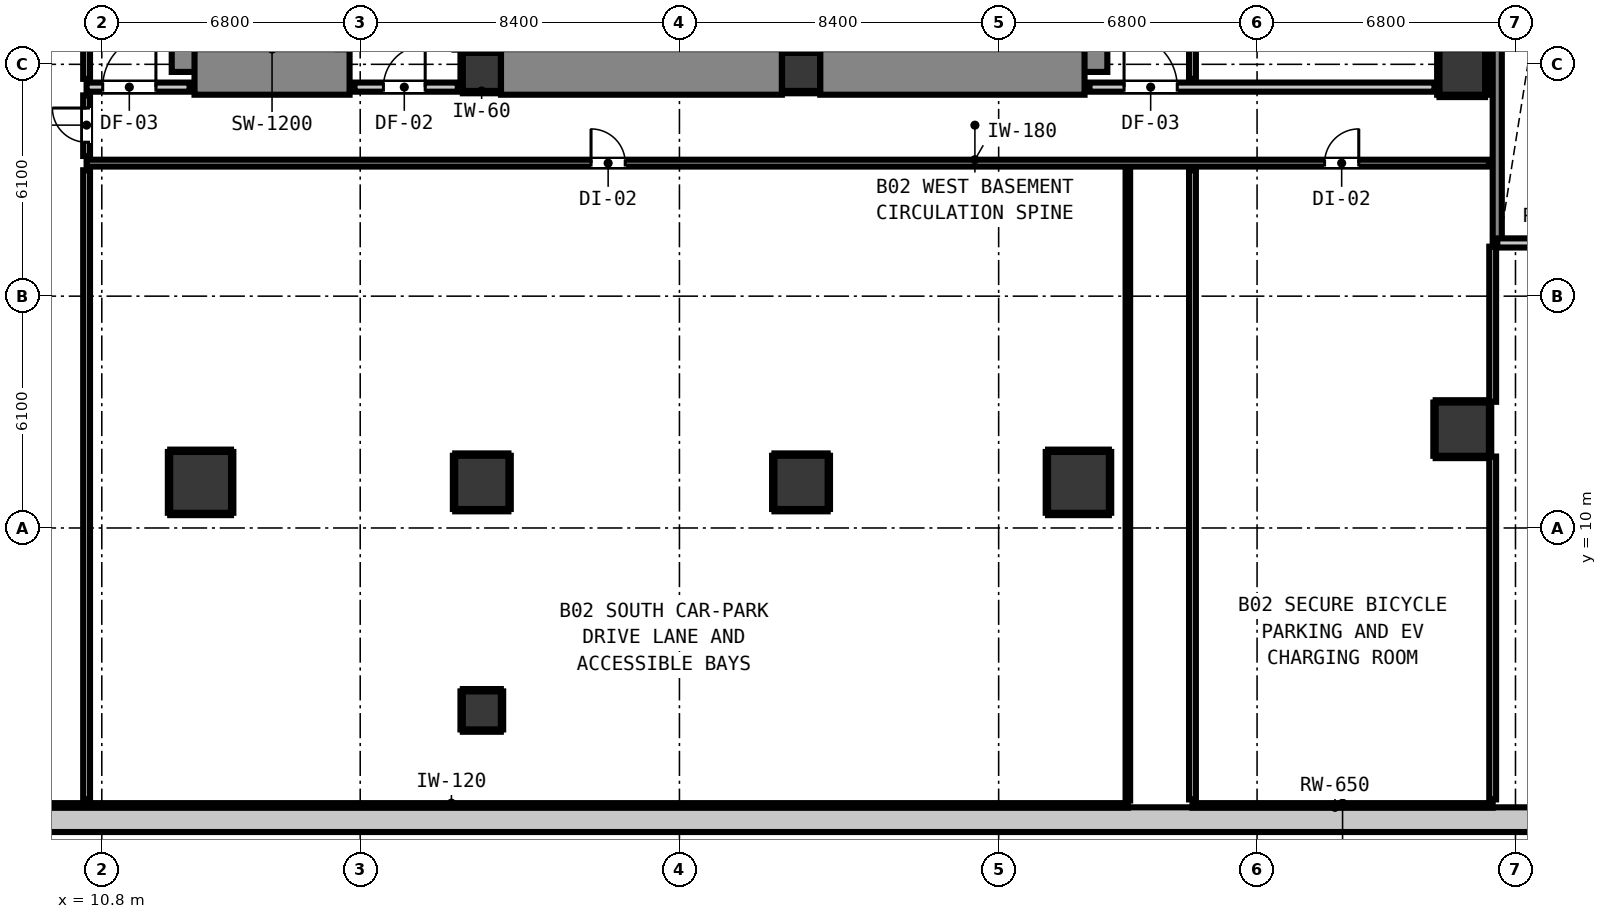
"""IFC4 building model, lengths in metres.
Left out: names, types, materials, properties, quantities, classifications, styles, units other than length and angle.
Written with IfcOpenShell. Run it as: python <this file> out.ifc"""

import sys

from ifc_helpers import new_model, si_unit, direction, frame, frame_2d, origin, origin_2d, place, context, subcontext, project, spatial, rectangle, circle, extrude, element, fill, save


model = new_model("IFC4")
c1 = context("Model", 3, precision=1e-05, world=origin(), true_north=direction((0.0, 1.0)))
c2 = subcontext(c1, "Body", "Model", "MODEL_VIEW")
j1 = project(units=[si_unit("LENGTHUNIT", "METRE"), si_unit("PLANEANGLEUNIT", "RADIAN")], contexts=[c1])
p1 = place(None, origin())
s1 = spatial("IfcSite", under=j1, at=p1, CompositionType="ELEMENT")
p2 = place(p1, origin())
s2 = spatial("IfcBuilding", under=s1, at=p2, CompositionType="ELEMENT")
p3 = place(p2, frame((0.0, 0.0, -8.8)))
s3 = spatial("IfcBuildingStorey", under=s2, at=p3, CompositionType="ELEMENT", Elevation=-8.8)
p4 = place(p3, frame((1.5, 2.325, 0.0), z_axis=(0.0, 0.0, 1.0), x_axis=(1.0, 0.0, 0.0)))
e1 = element("IfcWall", 1, at=p4, inside=s3, PredefinedType="SOLIDWALL", context=c2, shape_type="SweptSolid", body=[
    extrude(rectangle(XDim=83.5, YDim=0.65, at=frame_2d((41.75, 0.0))), origin(), (0.0, 0.0, 1.0), 4.4),
])
for number, where, z_axis, x_axis in (
    (2, (20.8, 22.0, 0.0), (0.0, 0.0, 1.0), (1.0, 0.0, 0.0)),
    (3, (29.2, 22.0, 0.0), (0.0, 0.0, 1.0), (1.0, 0.0, 0.0)),
):
    element("IfcColumn", number, at=place(p3, frame(where, z_axis=z_axis, x_axis=x_axis)), inside=s3, PredefinedType="COLUMN", context=c2, shape_type="SweptSolid", body=[
        extrude(rectangle(XDim=1.0, YDim=1.0, at=origin_2d()), origin(), (0.0, 0.0, 1.0), 4.4),
    ])
p5 = place(p3, frame((13.24, 22.0, 0.0), z_axis=(0.0, 0.0, 1.0), x_axis=(0.0, 1.0, 0.0)))
e4 = element("IfcWall", 4, at=p5, inside=s3, PredefinedType="SHEAR", context=c2, shape_type="SweptSolid", body=[
    extrude(rectangle(XDim=8.195, YDim=1.2, at=frame_2d((4.098, 0.0))), origin(), (0.0, 0.0, 1.0), 4.4),
])
p6 = place(p3, frame((13.24, 22.0, 0.0), z_axis=(0.0, 0.0, 1.0), x_axis=(1.0, 0.0, 0.0)))
e5 = element("IfcWall", 5, at=p6, inside=s3, PredefinedType="SHEAR", context=c2, shape_type="SweptSolid", body=[
    extrude(rectangle(XDim=4.08, YDim=1.2, at=frame_2d((2.04, 0.0))), origin(), (0.0, 0.0, 1.0), 4.4),
])
p7 = place(p3, frame((36.66, 22.0, 0.0), z_axis=(0.0, 0.0, 1.0), x_axis=(0.0, 1.0, 0.0)))
e6 = element("IfcWall", 6, at=p7, inside=s3, PredefinedType="SHEAR", context=c2, shape_type="SweptSolid", body=[
    extrude(rectangle(XDim=8.195, YDim=1.2, at=frame_2d((4.098, 0.0))), origin(), (0.0, 0.0, 1.0), 4.4),
])
p8 = place(p3, frame((29.705, 22.0, 0.0), z_axis=(0.0, 0.0, 1.0), x_axis=(1.0, 0.0, 0.0)))
e7 = element("IfcWall", 7, at=p8, inside=s3, PredefinedType="SHEAR", context=c2, shape_type="SweptSolid", body=[
    extrude(rectangle(XDim=6.955, YDim=1.2, at=frame_2d((3.478, 0.0))), origin(), (0.0, 0.0, 1.0), 4.4),
])
p9 = place(p3, frame((21.305, 22.0, 0.0), z_axis=(0.0, 0.0, 1.0), x_axis=(1.0, 0.0, 0.0)))
e8 = element("IfcWall", 8, at=p9, inside=s3, PredefinedType="SHEAR", context=c2, shape_type="SweptSolid", body=[
    extrude(rectangle(XDim=7.39, YDim=1.2, at=frame_2d((3.695, 0.0))), origin(), (0.0, 0.0, 1.0), 4.4),
])
p10 = place(p3, frame((47.52, 17.5, 0.0), z_axis=(0.0, 0.0, 1.0), x_axis=(0.0, 1.0, 0.0)))
e9 = element("IfcWall", 9, at=p10, inside=s3, PredefinedType="SHEAR", context=c2, shape_type="SweptSolid", body=[
    extrude(rectangle(XDim=19.2, YDim=0.24, at=frame_2d((9.6, 0.0))), origin(), (0.0, 0.0, 1.0), 4.4),
])
for number, where, z_axis, x_axis in (
    (10, (13.4, 11.2, 0.0), (0.0, 0.0, 1.0), (1.0, 0.0, 0.0)),
    (11, (36.5, 11.2, 0.0), (0.0, 0.0, 1.0), (1.0, 0.0, 0.0)),
):
    element("IfcColumn", number, at=place(p3, frame(where, z_axis=z_axis, x_axis=x_axis)), inside=s3, PredefinedType="COLUMN", context=c2, shape_type="SweptSolid", body=[
        extrude(rectangle(XDim=1.6, YDim=1.6, at=origin_2d()), origin(), (0.0, 0.0, 1.0), 4.4),
    ])
p11 = place(p3, frame((46.6, 22.0, 0.0), z_axis=(0.0, 0.0, 1.0), x_axis=(1.0, 0.0, 0.0)))
e12 = element("IfcColumn", 12, at=p11, inside=s3, PredefinedType="COLUMN", context=c2, shape_type="SweptSolid", body=[
    extrude(circle(Radius=0.6, at=origin_2d()), origin(), (0.0, 0.0, 1.0), 4.4),
])
for number, where, z_axis, x_axis in (
    (13, (46.6, 12.6, 0.0), (0.0, 0.0, 1.0), (1.0, 0.0, 0.0)),
    (14, (20.8, 11.2, 0.0), (0.0, 0.0, 1.0), (1.0, 0.0, 0.0)),
    (15, (29.2, 11.2, 0.0), (0.0, 0.0, 1.0), (1.0, 0.0, 0.0)),
):
    element("IfcColumn", number, at=place(p3, frame(where, z_axis=z_axis, x_axis=x_axis)), inside=s3, PredefinedType="COLUMN", context=c2, shape_type="SweptSolid", body=[
        extrude(rectangle(XDim=1.4, YDim=1.4, at=origin_2d()), origin(), (0.0, 0.0, 1.0), 4.4),
    ])
p12 = place(p3, frame((20.8, 5.2, 0.0), z_axis=(0.0, 0.0, 1.0), x_axis=(1.0, 0.0, 0.0)))
e16 = element("IfcColumn", 16, at=p12, inside=s3, PredefinedType="COLUMN", context=c2, shape_type="SweptSolid", body=[
    extrude(rectangle(XDim=1.0, YDim=1.0, at=origin_2d()), origin(), (0.0, 0.0, 1.0), 4.4),
])
p13 = place(p3, frame((47.52, 17.5, 0.0), z_axis=(0.0, 0.0, 1.0), x_axis=(1.0, 0.0, 0.0)))
e17 = element("IfcWall", 17, at=p13, inside=s3, PredefinedType="PARAPET", context=c2, shape_type="SweptSolid", body=[
    extrude(rectangle(XDim=3.16, YDim=0.24, at=frame_2d((1.58, 0.0))), origin(), (0.0, 0.0, 1.0), 1.2),
])
p14 = place(p3, frame((10.4, 21.6, 0.0), z_axis=(0.0, 0.0, 1.0), x_axis=(1.0, 0.0, 0.0)))
e18 = element("IfcWall", 18, at=p14, inside=s3, PredefinedType="PARTITIONING", context=c2, shape_type="SweptSolid", body=[
    extrude(rectangle(XDim=2.71, YDim=0.24, at=frame_2d((1.355, 0.0))), origin(), (0.0, 0.0, 1.0), 3.335),
])
p15 = place(p14, frame((0.424, 0.0, 0.0)))
e19 = element("IfcOpeningElement", 19, at=p15, cuts=e18, PredefinedType="OPENING", context=c2, shape_type="SweptSolid", body=[
    extrude(rectangle(XDim=1.4, YDim=2.15, at=frame_2d((0.7, 1.075))), frame((0.0, 0.13, 0.0), z_axis=(0.0, -1.0, 0.0), x_axis=(1.0, 0.0, 0.0)), (0.0, 0.0, 1.0), 0.26),
])
p16 = place(p3, frame((17.45, 21.6, 0.0), z_axis=(0.0, 0.0, 1.0), x_axis=(1.0, 0.0, 0.0)))
e20 = element("IfcWall", 20, at=p16, inside=s3, PredefinedType="PARTITIONING", context=c2, shape_type="SweptSolid", body=[
    extrude(rectangle(XDim=2.718, YDim=0.24, at=frame_2d((1.359, 0.0))), origin(), (0.0, 0.0, 1.0), 3.335),
])
p17 = place(p16, frame((0.76, 0.0, 0.0)))
e21 = element("IfcOpeningElement", 21, at=p17, cuts=e20, PredefinedType="OPENING", context=c2, shape_type="SweptSolid", body=[
    extrude(rectangle(XDim=1.1, YDim=2.15, at=frame_2d((0.55, 1.075))), frame((0.0, 0.13, 0.0), z_axis=(0.0, -1.0, 0.0), x_axis=(1.0, 0.0, 0.0)), (0.0, 0.0, 1.0), 0.26),
])
p18 = place(p3, frame((36.79, 21.6, 0.0), z_axis=(0.0, 0.0, 1.0), x_axis=(1.0, 0.0, 0.0)))
e22 = element("IfcWall", 22, at=p18, inside=s3, PredefinedType="PARTITIONING", context=c2, shape_type="SweptSolid", body=[
    extrude(rectangle(XDim=9.078, YDim=0.24, at=frame_2d((4.539, 0.0))), origin(), (0.0, 0.0, 1.0), 3.335),
])
p19 = place(p18, frame((0.91, 0.0, 0.0)))
e23 = element("IfcOpeningElement", 23, at=p19, cuts=e22, PredefinedType="OPENING", context=c2, shape_type="SweptSolid", body=[
    extrude(rectangle(XDim=1.4, YDim=2.15, at=frame_2d((0.7, 1.075))), frame((0.0, 0.13, 0.0), z_axis=(0.0, -1.0, 0.0), x_axis=(1.0, 0.0, 0.0)), (0.0, 0.0, 1.0), 0.26),
])
p20 = place(p3, frame((10.4, 19.6, 0.0), z_axis=(0.0, 0.0, 1.0), x_axis=(1.0, 0.0, 0.0)))
e24 = element("IfcWall", 24, at=p20, inside=s3, PredefinedType="PARTITIONING", context=c2, shape_type="SweptSolid", body=[
    extrude(rectangle(XDim=36.902, YDim=0.18, at=frame_2d((18.451, 0.0))), origin(), (0.0, 0.0, 1.0), 4.1),
])
p21 = place(p20, frame((13.274, 0.0, 0.0)))
e25 = element("IfcOpeningElement", 25, at=p21, cuts=e24, PredefinedType="OPENING", context=c2, shape_type="SweptSolid", body=[
    extrude(rectangle(XDim=0.9, YDim=2.1, at=frame_2d((0.45, 1.05))), frame((0.0, 0.1, 0.0), z_axis=(0.0, -1.0, 0.0), x_axis=(1.0, 0.0, 0.0)), (0.0, 0.0, 1.0), 0.2),
])
p22 = place(p20, frame((32.576, 0.0, 0.0)))
e26 = element("IfcOpeningElement", 26, at=p22, cuts=e24, PredefinedType="OPENING", context=c2, shape_type="SweptSolid", body=[
    extrude(rectangle(XDim=0.9, YDim=2.1, at=frame_2d((0.45, 1.05))), frame((0.0, 0.1, 0.0), z_axis=(0.0, -1.0, 0.0), x_axis=(1.0, 0.0, 0.0)), (0.0, 0.0, 1.0), 0.2),
])
p23 = place(p3, frame((2.2, 2.7, 0.0), z_axis=(0.0, 0.0, 1.0), x_axis=(1.0, 0.0, 0.0)))
e27 = element("IfcWall", 27, at=p23, inside=s3, PredefinedType="PARTITIONING", context=c2, shape_type="SweptSolid", body=[
    extrude(rectangle(XDim=35.6, YDim=0.12, at=frame_2d((17.8, 0.0))), origin(), (0.0, 0.0, 1.0), 4.1),
])
p24 = place(p3, frame((39.5, 2.7, 0.0), z_axis=(0.0, 0.0, 1.0), x_axis=(1.0, 0.0, 0.0)))
e28 = element("IfcWall", 28, at=p24, inside=s3, PredefinedType="PARTITIONING", context=c2, shape_type="SweptSolid", body=[
    extrude(rectangle(XDim=7.9, YDim=0.12, at=frame_2d((3.95, 0.0))), origin(), (0.0, 0.0, 1.0), 4.1),
])
p25 = place(p3, frame((10.4, 2.858, 0.0), z_axis=(0.0, 0.0, 1.0), x_axis=(0.0, 1.0, 0.0)))
e29 = element("IfcWall", 29, at=p25, inside=s3, PredefinedType="PARTITIONING", context=c2, shape_type="SweptSolid", body=[
    extrude(rectangle(XDim=16.554, YDim=0.18, at=frame_2d((8.277, 0.0))), origin(), (0.0, 0.0, 1.0), 4.1),
])
p26 = place(p3, frame((10.4, 19.788, 0.0), z_axis=(0.0, 0.0, 1.0), x_axis=(0.0, 1.0, 0.0)))
e30 = element("IfcWall", 30, at=p26, inside=s3, PredefinedType="PARTITIONING", context=c2, shape_type="SweptSolid", body=[
    extrude(rectangle(XDim=1.594, YDim=0.18, at=frame_2d((0.797, 0.0))), origin(), (0.0, 0.0, 1.0), 4.1),
])
p27 = place(p26, frame((0.362, 0.0, 0.0)))
e31 = element("IfcOpeningElement", 31, at=p27, cuts=e30, PredefinedType="OPENING", context=c2, shape_type="SweptSolid", body=[
    extrude(rectangle(XDim=0.9, YDim=2.1, at=frame_2d((0.45, 1.05))), frame((0.0, 0.1, 0.0), z_axis=(0.0, -1.0, 0.0), x_axis=(1.0, 0.0, 0.0)), (0.0, 0.0, 1.0), 0.2),
])
p28 = place(p3, frame((10.4, 21.818, 0.0), z_axis=(0.0, 0.0, 1.0), x_axis=(0.0, 1.0, 0.0)))
e32 = element("IfcWall", 32, at=p28, inside=s3, PredefinedType="PARTITIONING", context=c2, shape_type="SweptSolid", body=[
    extrude(rectangle(XDim=17.794, YDim=0.18, at=frame_2d((8.897, 0.0))), origin(), (0.0, 0.0, 1.0), 4.1),
])
p29 = place(p3, frame((39.5, 2.858, 0.0), z_axis=(0.0, 0.0, 1.0), x_axis=(0.0, 1.0, 0.0)))
e33 = element("IfcWall", 33, at=p29, inside=s3, PredefinedType="PARTITIONING", context=c2, shape_type="SweptSolid", body=[
    extrude(rectangle(XDim=16.554, YDim=0.18, at=frame_2d((8.277, 0.0))), origin(), (0.0, 0.0, 1.0), 4.1),
])
p30 = place(p3, frame((39.5, 21.818, 0.0), z_axis=(0.0, 0.0, 1.0), x_axis=(0.0, 1.0, 0.0)))
e34 = element("IfcWall", 34, at=p30, inside=s3, PredefinedType="PARTITIONING", context=c2, shape_type="SweptSolid", body=[
    extrude(rectangle(XDim=17.794, YDim=0.18, at=frame_2d((8.897, 0.0))), origin(), (0.0, 0.0, 1.0), 4.1),
])
p31 = place(p3, frame((47.4, 2.858, 0.0), z_axis=(0.0, 0.0, 1.0), x_axis=(0.0, 1.0, 0.0)))
e35 = element("IfcWall", 35, at=p31, inside=s3, PredefinedType="PARTITIONING", context=c2, shape_type="SweptSolid", body=[
    extrude(rectangle(XDim=9.022, YDim=0.18, at=frame_2d((4.511, 0.0))), origin(), (0.0, 0.0, 1.0), 4.1),
])
p32 = place(p3, frame((47.4, 13.32, 0.0), z_axis=(0.0, 0.0, 1.0), x_axis=(0.0, 1.0, 0.0)))
e36 = element("IfcWall", 36, at=p32, inside=s3, PredefinedType="PARTITIONING", context=c2, shape_type="SweptSolid", body=[
    extrude(rectangle(XDim=4.082, YDim=0.18, at=frame_2d((2.041, 0.0))), origin(), (0.0, 0.0, 1.0), 4.1),
])
p33 = place(p3, frame((37.8, 2.828, 0.0), z_axis=(0.0, 0.0, 1.0), x_axis=(0.0, 1.0, 0.0)))
e37 = element("IfcWall", 37, at=p33, inside=s3, PredefinedType="PARTITIONING", context=c2, shape_type="SweptSolid", body=[
    extrude(rectangle(XDim=16.614, YDim=0.12, at=frame_2d((8.307, 0.0))), origin(), (0.0, 0.0, 1.0), 4.1),
])
for number, where, z_axis, x_axis in (
    (38, (20.3, 21.468, 0.0), (0.0, 0.0, 1.0), (1.0, 0.0, 0.0)),
    (39, (20.3, 22.532, 0.0), (0.0, 0.0, 1.0), (1.0, 0.0, 0.0)),
):
    element("IfcWall", number, at=place(p3, frame(where, z_axis=z_axis, x_axis=x_axis)), inside=s3, PredefinedType="PARTITIONING", context=c2, shape_type="SweptSolid", body=[
        extrude(rectangle(XDim=0.99, YDim=0.06, at=frame_2d((0.495, 0.0))), origin(), (0.0, 0.0, 1.0), 1.45),
    ])
p34 = place(p3, frame((20.268, 21.5, 0.0), z_axis=(0.0, 0.0, 1.0), x_axis=(0.0, 1.0, 0.0)))
e40 = element("IfcWall", 40, at=p34, inside=s3, PredefinedType="PARTITIONING", context=c2, shape_type="SweptSolid", body=[
    extrude(rectangle(XDim=1.0, YDim=0.06, at=frame_2d((0.5, 0.0))), origin(), (0.0, 0.0, 1.0), 1.45),
])
for number, where, z_axis, x_axis in (
    (41, (28.71, 21.468, 0.0), (0.0, 0.0, 1.0), (1.0, 0.0, 0.0)),
    (42, (28.71, 22.532, 0.0), (0.0, 0.0, 1.0), (1.0, 0.0, 0.0)),
):
    element("IfcWall", number, at=place(p3, frame(where, z_axis=z_axis, x_axis=x_axis)), inside=s3, PredefinedType="PARTITIONING", context=c2, shape_type="SweptSolid", body=[
        extrude(rectangle(XDim=0.98, YDim=0.06, at=frame_2d((0.49, 0.0))), origin(), (0.0, 0.0, 1.0), 1.45),
    ])
for number, where, z_axis, x_axis in (
    (43, (12.6, 10.368, 0.0), (0.0, 0.0, 1.0), (1.0, 0.0, 0.0)),
    (44, (12.6, 12.032, 0.0), (0.0, 0.0, 1.0), (1.0, 0.0, 0.0)),
):
    element("IfcWall", number, at=place(p3, frame(where, z_axis=z_axis, x_axis=x_axis)), inside=s3, PredefinedType="PARTITIONING", context=c2, shape_type="SweptSolid", body=[
        extrude(rectangle(XDim=1.6, YDim=0.06, at=frame_2d((0.8, 0.0))), origin(), (0.0, 0.0, 1.0), 1.45),
    ])
for number, where, z_axis, x_axis in (
    (45, (12.568, 10.4, 0.0), (0.0, 0.0, 1.0), (0.0, 1.0, 0.0)),
    (46, (14.232, 10.4, 0.0), (0.0, 0.0, 1.0), (0.0, 1.0, 0.0)),
    (47, (35.7, 10.368, 0.0), (0.0, 0.0, 1.0), (1.0, 0.0, 0.0)),
    (48, (35.7, 12.032, 0.0), (0.0, 0.0, 1.0), (1.0, 0.0, 0.0)),
    (49, (35.668, 10.4, 0.0), (0.0, 0.0, 1.0), (0.0, 1.0, 0.0)),
    (50, (37.332, 10.4, 0.0), (0.0, 0.0, 1.0), (0.0, 1.0, 0.0)),
):
    element("IfcWall", number, at=place(p3, frame(where, z_axis=z_axis, x_axis=x_axis)), inside=s3, PredefinedType="PARTITIONING", context=c2, shape_type="SweptSolid", body=[
        extrude(rectangle(XDim=1.6, YDim=0.06, at=frame_2d((0.8, 0.0))), origin(), (0.0, 0.0, 1.0), 1.45),
    ])
p35 = place(p3, frame((46.0, 21.368, 0.0), z_axis=(0.0, 0.0, 1.0), x_axis=(1.0, 0.0, 0.0)))
e51 = element("IfcWall", 51, at=p35, inside=s3, PredefinedType="PARTITIONING", context=c2, shape_type="SweptSolid", body=[
    extrude(rectangle(XDim=1.2, YDim=0.06, at=frame_2d((0.6, 0.0))), origin(), (0.0, 0.0, 1.0), 1.45),
])
for number, where, z_axis, x_axis in (
    (52, (45.968, 21.4, 0.0), (0.0, 0.0, 1.0), (0.0, 1.0, 0.0)),
    (53, (47.232, 21.4, 0.0), (0.0, 0.0, 1.0), (0.0, 1.0, 0.0)),
):
    element("IfcWall", number, at=place(p3, frame(where, z_axis=z_axis, x_axis=x_axis)), inside=s3, PredefinedType="PARTITIONING", context=c2, shape_type="SweptSolid", body=[
        extrude(rectangle(XDim=1.2, YDim=0.06, at=frame_2d((0.6, 0.0))), origin(), (0.0, 0.0, 1.0), 1.45),
    ])
for number, where, z_axis, x_axis in (
    (54, (45.9, 11.868, 0.0), (0.0, 0.0, 1.0), (1.0, 0.0, 0.0)),
    (55, (45.9, 13.332, 0.0), (0.0, 0.0, 1.0), (1.0, 0.0, 0.0)),
    (56, (45.868, 11.9, 0.0), (0.0, 0.0, 1.0), (0.0, 1.0, 0.0)),
    (57, (47.332, 11.9, 0.0), (0.0, 0.0, 1.0), (0.0, 1.0, 0.0)),
):
    element("IfcWall", number, at=place(p3, frame(where, z_axis=z_axis, x_axis=x_axis)), inside=s3, PredefinedType="PARTITIONING", context=c2, shape_type="SweptSolid", body=[
        extrude(rectangle(XDim=1.4, YDim=0.06, at=frame_2d((0.7, 0.0))), origin(), (0.0, 0.0, 1.0), 1.45),
    ])
for number, where, z_axis, x_axis in (
    (58, (20.1, 10.468, 0.0), (0.0, 0.0, 1.0), (1.0, 0.0, 0.0)),
    (59, (20.1, 11.932, 0.0), (0.0, 0.0, 1.0), (1.0, 0.0, 0.0)),
    (60, (20.068, 10.5, 0.0), (0.0, 0.0, 1.0), (0.0, 1.0, 0.0)),
    (61, (21.532, 10.5, 0.0), (0.0, 0.0, 1.0), (0.0, 1.0, 0.0)),
    (62, (28.5, 10.468, 0.0), (0.0, 0.0, 1.0), (1.0, 0.0, 0.0)),
    (63, (28.5, 11.932, 0.0), (0.0, 0.0, 1.0), (1.0, 0.0, 0.0)),
    (64, (28.468, 10.5, 0.0), (0.0, 0.0, 1.0), (0.0, 1.0, 0.0)),
    (65, (29.932, 10.5, 0.0), (0.0, 0.0, 1.0), (0.0, 1.0, 0.0)),
):
    element("IfcWall", number, at=place(p3, frame(where, z_axis=z_axis, x_axis=x_axis)), inside=s3, PredefinedType="PARTITIONING", context=c2, shape_type="SweptSolid", body=[
        extrude(rectangle(XDim=1.4, YDim=0.06, at=frame_2d((0.7, 0.0))), origin(), (0.0, 0.0, 1.0), 1.45),
    ])
for number, where, z_axis, x_axis in (
    (66, (20.3, 4.668, 0.0), (0.0, 0.0, 1.0), (1.0, 0.0, 0.0)),
    (67, (20.3, 5.732, 0.0), (0.0, 0.0, 1.0), (1.0, 0.0, 0.0)),
    (68, (20.268, 4.7, 0.0), (0.0, 0.0, 1.0), (0.0, 1.0, 0.0)),
    (69, (21.332, 4.7, 0.0), (0.0, 0.0, 1.0), (0.0, 1.0, 0.0)),
):
    element("IfcWall", number, at=place(p3, frame(where, z_axis=z_axis, x_axis=x_axis)), inside=s3, PredefinedType="PARTITIONING", context=c2, shape_type="SweptSolid", body=[
        extrude(rectangle(XDim=1.0, YDim=0.06, at=frame_2d((0.5, 0.0))), origin(), (0.0, 0.0, 1.0), 1.45),
    ])
p36 = place(p17, origin())
e70 = element("IfcDoor", 70, at=p36, inside=s3, OperationType="SINGLE_SWING_RIGHT", PredefinedType="DOOR", context=c2, shape_type="SweptSolid", body=[
    extrude(rectangle(XDim=1.1, YDim=2.15, at=frame_2d((0.55, 1.075))), frame((0.0, 0.025, 0.0), z_axis=(0.0, -1.0, 0.0), x_axis=(1.0, 0.0, 0.0)), (0.0, 0.0, 1.0), 0.05),
])
fill(e21, e70)
p37 = place(p15, origin())
e71 = element("IfcDoor", 71, at=p37, inside=s3, OperationType="SINGLE_SWING_RIGHT", PredefinedType="DOOR", context=c2, shape_type="SweptSolid", body=[
    extrude(rectangle(XDim=1.4, YDim=2.15, at=frame_2d((0.7, 1.075))), frame((0.0, 0.025, 0.0), z_axis=(0.0, -1.0, 0.0), x_axis=(1.0, 0.0, 0.0)), (0.0, 0.0, 1.0), 0.05),
])
fill(e19, e71)
p38 = place(p19, origin())
e72 = element("IfcDoor", 72, at=p38, inside=s3, OperationType="SINGLE_SWING_LEFT", PredefinedType="DOOR", context=c2, shape_type="SweptSolid", body=[
    extrude(rectangle(XDim=1.4, YDim=2.15, at=frame_2d((0.7, 1.075))), frame((0.0, 0.025, 0.0), z_axis=(0.0, -1.0, 0.0), x_axis=(1.0, 0.0, 0.0)), (0.0, 0.0, 1.0), 0.05),
])
fill(e23, e72)
p39 = place(p27, origin())
e73 = element("IfcDoor", 73, at=p39, inside=s3, OperationType="SINGLE_SWING_RIGHT", PredefinedType="DOOR", context=c2, shape_type="SweptSolid", body=[
    extrude(rectangle(XDim=0.9, YDim=2.1, at=frame_2d((0.45, 1.05))), frame((0.0, 0.025, 0.0), z_axis=(0.0, -1.0, 0.0), x_axis=(1.0, 0.0, 0.0)), (0.0, 0.0, 1.0), 0.05),
])
fill(e31, e73)
p40 = place(p21, origin())
e74 = element("IfcDoor", 74, at=p40, inside=s3, OperationType="SINGLE_SWING_LEFT", PredefinedType="DOOR", context=c2, shape_type="SweptSolid", body=[
    extrude(rectangle(XDim=0.9, YDim=2.1, at=frame_2d((0.45, 1.05))), frame((0.0, 0.025, 0.0), z_axis=(0.0, -1.0, 0.0), x_axis=(1.0, 0.0, 0.0)), (0.0, 0.0, 1.0), 0.05),
])
fill(e25, e74)
p41 = place(p22, origin())
e75 = element("IfcDoor", 75, at=p41, inside=s3, OperationType="SINGLE_SWING_RIGHT", PredefinedType="DOOR", context=c2, shape_type="SweptSolid", body=[
    extrude(rectangle(XDim=0.9, YDim=2.1, at=frame_2d((0.45, 1.05))), frame((0.0, 0.025, 0.0), z_axis=(0.0, -1.0, 0.0), x_axis=(1.0, 0.0, 0.0)), (0.0, 0.0, 1.0), 0.05),
])
fill(e26, e75)
save(model, sys.argv[1])
